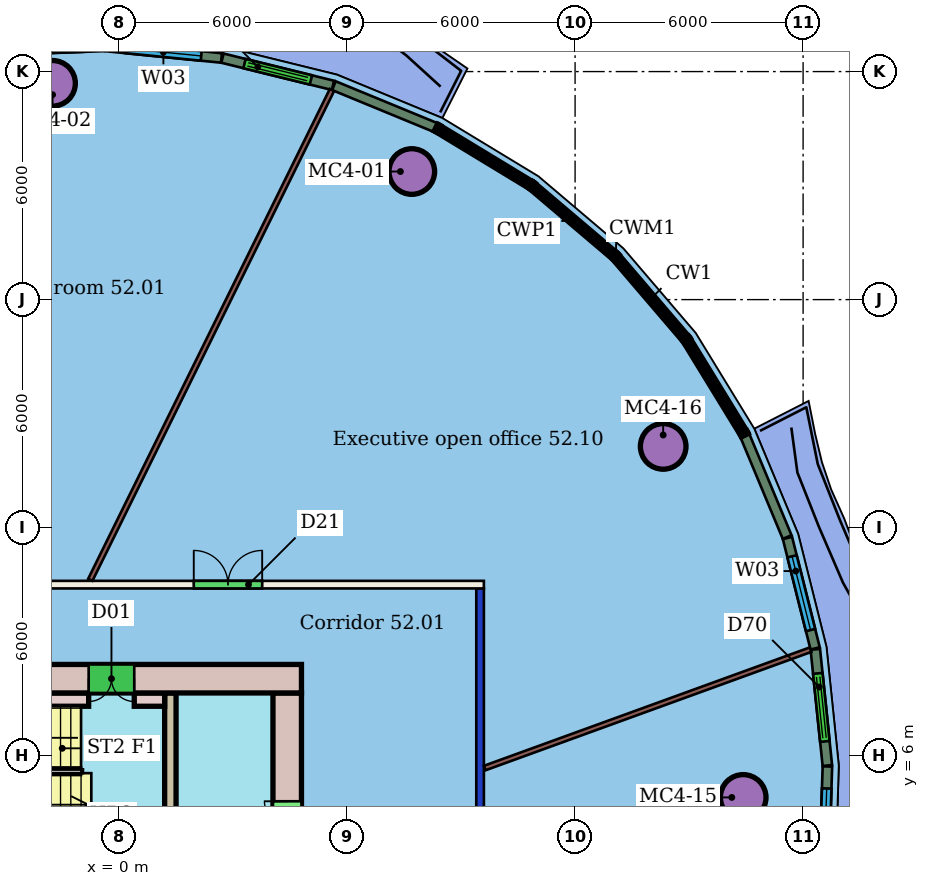
"""IFC4 building model, lengths in metres.
Left out: names, types, materials, properties, quantities, classifications, styles, units other than length and angle.
Written with IfcOpenShell. Run it as: python <this file> out.ifc"""

import sys

from ifc_helpers import new_model, si_unit, direction, frame, frame_2d, origin, origin_2d, place, context, subcontext, project, spatial, rectangle, hollow_circle, extrude, element, fill, save


model = new_model("IFC4")
c1 = context("Model", 3, precision=1e-05, world=origin(), true_north=direction((0.0, 1.0)))
c2 = subcontext(c1, "Body", "Model", "MODEL_VIEW")
j1 = project(units=[si_unit("LENGTHUNIT", "METRE"), si_unit("PLANEANGLEUNIT", "RADIAN")], contexts=[c1])
p1 = place(None, origin())
s1 = spatial("IfcSite", under=j1, at=p1, CompositionType="ELEMENT")
p2 = place(p1, origin())
s2 = spatial("IfcBuilding", under=s1, at=p2, CompositionType="ELEMENT")
p3 = place(p2, frame((0.0, 0.0, 213.7)))
s3 = spatial("IfcBuildingStorey", under=s2, at=p3, CompositionType="ELEMENT", Elevation=213.7)
for number, where, z_axis, x_axis in (
    (1, (7.704, 21.37, 0.0), (0.0, 0.0, 1.0), (1.0, 0.0, 0.0)),
    (2, (-1.75, 23.691, 0.0), (0.0, 0.0, 1.0), (1.0, 0.0, 0.0)),
    (3, (16.424, 4.901, 0.0), (0.0, 0.0, 1.0), (1.0, 0.0, 0.0)),
    (4, (14.318, 14.137, 0.0), (0.0, 0.0, 1.0), (1.0, 0.0, 0.0)),
):
    element("IfcColumn", number, at=place(p3, frame(where, z_axis=z_axis, x_axis=x_axis)), inside=s3, PredefinedType="COLUMN", context=c2, shape_type="SweptSolid", body=[
        extrude(hollow_circle(Radius=0.6, WallThickness=0.045, at=origin_2d()), origin(), (0.0, 0.0, 1.0), 3.45),
    ])
p4 = place(p3, frame((-21.6, 10.5, 0.0), z_axis=(0.0, 0.0, 1.0), x_axis=(1.0, 0.0, 0.0)))
e5 = element("IfcWall", 5, at=p4, inside=s3, PredefinedType="PARTITIONING", context=c2, shape_type="SweptSolid", body=[
    extrude(rectangle(XDim=31.2, YDim=0.2, at=frame_2d((15.6, 0.0))), origin(), (0.0, 0.0, 1.0), 3.45),
])
p5 = place(p4, frame((18.296, 0.0, 0.0)))
e6 = element("IfcOpeningElement", 6, at=p5, cuts=e5, PredefinedType="OPENING", context=c2, shape_type="SweptSolid", body=[
    extrude(rectangle(XDim=1.0, YDim=2.4, at=frame_2d((0.5, 1.2))), frame((0.0, 0.11, 0.0), z_axis=(0.0, -1.0, 0.0), x_axis=(1.0, 0.0, 0.0)), (0.0, 0.0, 1.0), 0.22),
])
p6 = place(p4, frame((11.6, 0.0, 0.0)))
e7 = element("IfcOpeningElement", 7, at=p6, cuts=e5, PredefinedType="OPENING", context=c2, shape_type="SweptSolid", body=[
    extrude(rectangle(XDim=1.0, YDim=2.4, at=frame_2d((0.5, 1.2))), frame((0.0, 0.11, 0.0), z_axis=(0.0, -1.0, 0.0), x_axis=(1.0, 0.0, 0.0)), (0.0, 0.0, 1.0), 0.22),
])
p7 = place(p4, frame((5.73, 0.0, 0.0)))
e8 = element("IfcOpeningElement", 8, at=p7, cuts=e5, PredefinedType="OPENING", context=c2, shape_type="SweptSolid", body=[
    extrude(rectangle(XDim=1.8, YDim=2.4, at=frame_2d((0.9, 1.2))), frame((0.0, 0.11, 0.0), z_axis=(0.0, -1.0, 0.0), x_axis=(1.0, 0.0, 0.0)), (0.0, 0.0, 1.0), 0.22),
])
p8 = place(p4, frame((23.566, 0.0, 0.0)))
e9 = element("IfcOpeningElement", 9, at=p8, cuts=e5, PredefinedType="OPENING", context=c2, shape_type="SweptSolid", body=[
    extrude(rectangle(XDim=1.8, YDim=2.1, at=frame_2d((0.9, 1.05))), frame((0.0, 0.11, 0.0), z_axis=(0.0, -1.0, 0.0), x_axis=(1.0, 0.0, 0.0)), (0.0, 0.0, 1.0), 0.22),
])
p9 = place(p3, frame((9.5, 10.4, 0.0), z_axis=(0.0, 0.0, 1.0), x_axis=(0.0, -1.0, 0.0)))
e10 = element("IfcWall", 10, at=p9, inside=s3, PredefinedType="PARTITIONING", context=c2, shape_type="SweptSolid", body=[
    extrude(rectangle(XDim=20.8, YDim=0.2, at=frame_2d((10.4, 0.0))), origin(), (0.0, 0.0, 1.0), 3.05),
])
p10 = place(p9, frame((17.01, 0.0, 0.0)))
e11 = element("IfcOpeningElement", 11, at=p10, cuts=e10, PredefinedType="OPENING", context=c2, shape_type="SweptSolid", body=[
    extrude(rectangle(XDim=1.0, YDim=2.4, at=frame_2d((0.5, 1.2))), frame((0.0, 0.11, 0.0), z_axis=(0.0, -1.0, 0.0), x_axis=(1.0, 0.0, 0.0)), (0.0, 0.0, 1.0), 0.22),
])
p11 = place(p9, frame((11.015, 0.0, 0.0)))
e12 = element("IfcOpeningElement", 12, at=p11, cuts=e10, PredefinedType="OPENING", context=c2, shape_type="SweptSolid", body=[
    extrude(rectangle(XDim=1.5, YDim=2.1, at=frame_2d((0.75, 1.05))), frame((0.0, 0.11, 0.0), z_axis=(0.0, -1.0, 0.0), x_axis=(1.0, 0.0, 0.0)), (0.0, 0.0, 1.0), 0.22),
])
p12 = place(p3, frame((5.603, 23.515, 0.0), z_axis=(0.0, 0.0, 1.0), x_axis=(-0.442477794817, -0.896779460678, 0.0)))
e13 = element("IfcWall", 13, at=p12, inside=s3, PredefinedType="PARTITIONING", context=c2, shape_type="SweptSolid", body=[
    extrude(rectangle(XDim=14.371, YDim=0.125, at=frame_2d((7.186, 0.0))), origin(), (0.0, 0.0, 1.0), 3.45),
])
p13 = place(p3, frame((18.197, 8.789, 0.0), z_axis=(0.0, 0.0, 1.0), x_axis=(-0.939914460754, -0.341410026896, 0.0)))
e14 = element("IfcWall", 14, at=p13, inside=s3, PredefinedType="PARTITIONING", context=c2, shape_type="SweptSolid", body=[
    extrude(rectangle(XDim=9.124, YDim=0.125, at=frame_2d((4.562, 0.0))), origin(), (0.0, 0.0, 1.0), 3.45),
])
p14 = place(p3, frame((8.323, 22.53, 0.0), z_axis=(0.0, 0.0, 1.0), x_axis=(-0.924690360412, 0.380720024901, 0.0)))
e15 = element("IfcWall", 15, at=p14, inside=s3, PredefinedType="SOLIDWALL", context=c2, shape_type="SweptSolid", body=[
    extrude(rectangle(XDim=2.886, YDim=0.25, at=frame_2d((1.443, 0.0))), origin(), (0.0, 0.0, 1.0), 3.1),
])
p15 = place(p3, frame((5.628, 23.637, 0.0), z_axis=(0.0, 0.0, 1.0), x_axis=(-0.9709618668, 0.239234306113, 0.0)))
e16 = element("IfcWall", 16, at=p15, inside=s3, PredefinedType="SOLIDWALL", context=c2, shape_type="SweptSolid", body=[
    extrude(rectangle(XDim=2.994, YDim=0.25, at=frame_2d((1.497, 0.0))), origin(), (0.0, 0.0, 1.0), 3.1),
])
p16 = place(p15, frame((0.597, 0.0, 0.0)))
e17 = element("IfcOpeningElement", 17, at=p16, cuts=e16, PredefinedType="OPENING", context=c2, shape_type="SweptSolid", body=[
    extrude(rectangle(XDim=1.8, YDim=2.4, at=frame_2d((0.9, 1.2))), frame((0.0, 0.135, 0.0), z_axis=(0.0, -1.0, 0.0), x_axis=(1.0, 0.0, 0.0)), (0.0, 0.0, 1.0), 0.27),
])
p17 = place(p3, frame((2.696, 24.358, 0.0), z_axis=(0.0, 0.0, 1.0), x_axis=(-0.995081139356, 0.099063242917, 0.0)))
e18 = element("IfcWall", 18, at=p17, inside=s3, PredefinedType="SOLIDWALL", context=c2, shape_type="SweptSolid", body=[
    extrude(rectangle(XDim=3.073, YDim=0.25, at=frame_2d((1.537, 0.0))), origin(), (0.0, 0.0, 1.0), 3.1),
])
p18 = place(p17, frame((0.537, 0.0, 0.9)))
e19 = element("IfcOpeningElement", 19, at=p18, cuts=e18, PredefinedType="OPENING", context=c2, shape_type="SweptSolid", body=[
    extrude(rectangle(XDim=2.0, YDim=2.1, at=frame_2d((1.0, 1.05))), frame((0.0, 0.135, 0.0), z_axis=(0.0, -1.0, 0.0), x_axis=(1.0, 0.0, 0.0)), (0.0, 0.0, 1.0), 0.27),
])
p19 = place(p3, frame((-0.387, 24.663, 0.0), z_axis=(0.0, 0.0, 1.0), x_axis=(-0.999351383862, -0.036011270096, 0.0)))
e20 = element("IfcWall", 20, at=p19, inside=s3, PredefinedType="SOLIDWALL", context=c2, shape_type="SweptSolid", body=[
    extrude(rectangle(XDim=3.159, YDim=0.25, at=frame_2d((1.58, 0.0))), origin(), (0.0, 0.0, 1.0), 3.1),
])
p20 = place(p19, frame((0.58, 0.0, 0.9)))
e21 = element("IfcOpeningElement", 21, at=p20, cuts=e20, PredefinedType="OPENING", context=c2, shape_type="SweptSolid", body=[
    extrude(rectangle(XDim=2.0, YDim=2.1, at=frame_2d((1.0, 1.05))), frame((0.0, 0.135, 0.0), z_axis=(0.0, -1.0, 0.0), x_axis=(1.0, 0.0, 0.0)), (0.0, 0.0, 1.0), 0.27),
])
p21 = place(p3, frame((18.539, 2.558, 0.0), z_axis=(0.0, 0.0, 1.0), x_axis=(0.031760681262, 0.999495502304, 0.0)))
e22 = element("IfcWall", 22, at=p21, inside=s3, PredefinedType="SOLIDWALL", context=c2, shape_type="SweptSolid", body=[
    extrude(rectangle(XDim=3.159, YDim=0.25, at=frame_2d((1.58, 0.0))), origin(), (0.0, 0.0, 1.0), 3.1),
])
p22 = place(p21, frame((0.58, 0.0, 0.9)))
e23 = element("IfcOpeningElement", 23, at=p22, cuts=e22, PredefinedType="OPENING", context=c2, shape_type="SweptSolid", body=[
    extrude(rectangle(XDim=2.0, YDim=2.1, at=frame_2d((1.0, 1.05))), frame((0.0, 0.135, 0.0), z_axis=(0.0, -1.0, 0.0), x_axis=(1.0, 0.0, 0.0)), (0.0, 0.0, 1.0), 0.27),
])
p23 = place(p3, frame((18.639, 5.741, 0.0), z_axis=(0.0, 0.0, 1.0), x_axis=(-0.10327045025, 0.994653313524, 0.0)))
e24 = element("IfcWall", 24, at=p23, inside=s3, PredefinedType="SOLIDWALL", context=c2, shape_type="SweptSolid", body=[
    extrude(rectangle(XDim=3.073, YDim=0.25, at=frame_2d((1.537, 0.0))), origin(), (0.0, 0.0, 1.0), 3.1),
])
p24 = place(p23, frame((0.637, 0.0, 0.0)))
e25 = element("IfcOpeningElement", 25, at=p24, cuts=e24, PredefinedType="OPENING", context=c2, shape_type="SweptSolid", body=[
    extrude(rectangle(XDim=1.8, YDim=2.4, at=frame_2d((0.9, 1.2))), frame((0.0, 0.135, 0.0), z_axis=(0.0, -1.0, 0.0), x_axis=(1.0, 0.0, 0.0)), (0.0, 0.0, 1.0), 0.27),
])
p25 = place(p3, frame((18.317, 8.823, 0.0), z_axis=(0.0, 0.0, 1.0), x_axis=(-0.243245471753, 0.96996476249, 0.0)))
e26 = element("IfcWall", 26, at=p25, inside=s3, PredefinedType="SOLIDWALL", context=c2, shape_type="SweptSolid", body=[
    extrude(rectangle(XDim=2.994, YDim=0.25, at=frame_2d((1.497, 0.0))), origin(), (0.0, 0.0, 1.0), 3.1),
])
p26 = place(p25, frame((0.497, 0.0, 0.9)))
e27 = element("IfcOpeningElement", 27, at=p26, cuts=e26, PredefinedType="OPENING", context=c2, shape_type="SweptSolid", body=[
    extrude(rectangle(XDim=2.0, YDim=2.1, at=frame_2d((1.0, 1.05))), frame((0.0, 0.135, 0.0), z_axis=(0.0, -1.0, 0.0), x_axis=(1.0, 0.0, 0.0)), (0.0, 0.0, 1.0), 0.27),
])
p27 = place(p3, frame((17.58, 11.752, 0.0), z_axis=(0.0, 0.0, 1.0), x_axis=(-0.384537301957, 0.923109453642, 0.0)))
e28 = element("IfcWall", 28, at=p27, inside=s3, PredefinedType="SOLIDWALL", context=c2, shape_type="SweptSolid", body=[
    extrude(rectangle(XDim=2.886, YDim=0.25, at=frame_2d((1.443, 0.0))), origin(), (0.0, 0.0, 1.0), 3.1),
])
p28 = place(p3, frame((4.8, 8.025, 0.0), z_axis=(0.0, 0.0, 1.0), x_axis=(-1.0, 0.0, 0.0)))
e29 = element("IfcWall", 29, at=p28, inside=s3, PredefinedType="SHEAR", context=c2, shape_type="SweptSolid", body=[
    extrude(rectangle(XDim=10.8, YDim=0.75, at=frame_2d((5.4, 0.0))), origin(), (0.0, 0.0, 1.0), 3.3),
])
p29 = place(p28, frame((4.4, 0.0, 0.0)))
e30 = element("IfcOpeningElement", 30, at=p29, cuts=e29, PredefinedType="OPENING", context=c2, shape_type="SweptSolid", body=[
    extrude(rectangle(XDim=1.2, YDim=2.1, at=frame_2d((0.6, 1.05))), frame((0.0, 0.385, 0.0), z_axis=(0.0, -1.0, 0.0), x_axis=(1.0, 0.0, 0.0)), (0.0, 0.0, 1.0), 0.77),
])
p30 = place(p3, frame((4.425, -7.65, 0.0), z_axis=(0.0, 0.0, 1.0), x_axis=(0.0, 1.0, 0.0)))
e31 = element("IfcWall", 31, at=p30, inside=s3, PredefinedType="SHEAR", context=c2, shape_type="SweptSolid", body=[
    extrude(rectangle(XDim=15.3, YDim=0.75, at=frame_2d((7.65, 0.0))), origin(), (0.0, 0.0, 1.0), 3.3),
])
p31 = place(p30, frame((2.85, 0.0, 0.0)))
e32 = element("IfcOpeningElement", 32, at=p31, cuts=e31, PredefinedType="OPENING", context=c2, shape_type="SweptSolid", body=[
    extrude(rectangle(XDim=1.2, YDim=2.1, at=frame_2d((0.6, 1.05))), frame((0.0, 0.385, 0.0), z_axis=(0.0, -1.0, 0.0), x_axis=(1.0, 0.0, 0.0)), (0.0, 0.0, 1.0), 0.77),
])
p32 = place(p30, frame((11.25, 0.0, 0.0)))
e33 = element("IfcOpeningElement", 33, at=p32, cuts=e31, PredefinedType="OPENING", context=c2, shape_type="SweptSolid", body=[
    extrude(rectangle(XDim=1.2, YDim=2.1, at=frame_2d((0.6, 1.05))), frame((0.0, 0.385, 0.0), z_axis=(0.0, -1.0, 0.0), x_axis=(1.0, 0.0, 0.0)), (0.0, 0.0, 1.0), 0.77),
])
p33 = place(p3, frame((1.35, -7.65, 0.0), z_axis=(0.0, 0.0, 1.0), x_axis=(0.0, 1.0, 0.0)))
e34 = element("IfcWall", 34, at=p33, inside=s3, PredefinedType="SHEAR", context=c2, shape_type="SweptSolid", body=[
    extrude(rectangle(XDim=15.3, YDim=0.3, at=frame_2d((7.65, 0.0))), origin(), (0.0, 0.0, 1.0), 3.3),
])
p34 = place(p33, frame((1.56, 0.0, 0.0)))
e35 = element("IfcOpeningElement", 35, at=p34, cuts=e34, PredefinedType="OPENING", context=c2, shape_type="SweptSolid", body=[
    extrude(rectangle(XDim=1.0, YDim=2.1, at=frame_2d((0.5, 1.05))), frame((0.0, 0.16, 0.0), z_axis=(0.0, -1.0, 0.0), x_axis=(1.0, 0.0, 0.0)), (0.0, 0.0, 1.0), 0.32),
])
p35 = place(p33, frame((6.9, 0.0, 0.0)))
e36 = element("IfcOpeningElement", 36, at=p35, cuts=e34, PredefinedType="OPENING", context=c2, shape_type="SweptSolid", body=[
    extrude(rectangle(XDim=1.5, YDim=2.1, at=frame_2d((0.75, 1.05))), frame((0.0, 0.16, 0.0), z_axis=(0.0, -1.0, 0.0), x_axis=(1.0, 0.0, 0.0)), (0.0, 0.0, 1.0), 0.32),
])
p36 = place(p3, frame((-5.85, 7.475, 0.0), z_axis=(0.0, 0.0, 1.0), x_axis=(1.0, 0.0, 0.0)))
e37 = element("IfcWall", 37, at=p36, inside=s3, PredefinedType="SHEAR", context=c2, shape_type="SweptSolid", body=[
    extrude(rectangle(XDim=5.05, YDim=0.35, at=frame_2d((2.525, 0.0))), origin(), (0.0, 0.0, 1.0), 3.3),
])
p37 = place(p3, frame((0.4, 7.475, 0.0), z_axis=(0.0, 0.0, 1.0), x_axis=(1.0, 0.0, 0.0)))
e38 = element("IfcWall", 38, at=p37, inside=s3, PredefinedType="SHEAR", context=c2, shape_type="SweptSolid", body=[
    extrude(rectangle(XDim=0.8, YDim=0.35, at=frame_2d((0.4, 0.0))), origin(), (0.0, 0.0, 1.0), 3.3),
])
p38 = place(p8, origin())
e39 = element("IfcDoor", 39, at=p38, inside=s3, OperationType="DOUBLE_DOOR_SINGLE_SWING", PredefinedType="DOOR", context=c2, shape_type="SweptSolid", body=[
    extrude(rectangle(XDim=1.8, YDim=2.1, at=frame_2d((0.9, 1.05))), frame((0.0, 0.025, 0.0), z_axis=(0.0, -1.0, 0.0), x_axis=(1.0, 0.0, 0.0)), (0.0, 0.0, 1.0), 0.05),
])
fill(e9, e39)
p39 = place(p16, origin())
e40 = element("IfcDoor", 40, at=p39, inside=s3, OperationType="DOUBLE_DOOR_SLIDING", PredefinedType="DOOR", context=c2, shape_type="SweptSolid", body=[
    extrude(rectangle(XDim=1.8, YDim=2.4, at=frame_2d((0.9, 1.2))), frame((0.0, 0.025, 0.0), z_axis=(0.0, -1.0, 0.0), x_axis=(1.0, 0.0, 0.0)), (0.0, 0.0, 1.0), 0.05),
])
fill(e17, e40)
p40 = place(p18, origin())
e41 = element("IfcWindow", 41, at=p40, inside=s3, PartitioningType="SINGLE_PANEL", PredefinedType="WINDOW", context=c2, shape_type="SweptSolid", body=[
    extrude(rectangle(XDim=2.0, YDim=2.1, at=frame_2d((1.0, 1.05))), frame((0.0, 0.03, 0.0), z_axis=(0.0, -1.0, 0.0), x_axis=(1.0, 0.0, 0.0)), (0.0, 0.0, 1.0), 0.06),
])
fill(e19, e41)
p41 = place(p22, origin())
e42 = element("IfcWindow", 42, at=p41, inside=s3, PartitioningType="SINGLE_PANEL", PredefinedType="WINDOW", context=c2, shape_type="SweptSolid", body=[
    extrude(rectangle(XDim=2.0, YDim=2.1, at=frame_2d((1.0, 1.05))), frame((0.0, 0.03, 0.0), z_axis=(0.0, -1.0, 0.0), x_axis=(1.0, 0.0, 0.0)), (0.0, 0.0, 1.0), 0.06),
])
fill(e23, e42)
p42 = place(p24, origin())
e43 = element("IfcDoor", 43, at=p42, inside=s3, OperationType="DOUBLE_DOOR_SLIDING", PredefinedType="DOOR", context=c2, shape_type="SweptSolid", body=[
    extrude(rectangle(XDim=1.8, YDim=2.4, at=frame_2d((0.9, 1.2))), frame((0.0, 0.025, 0.0), z_axis=(0.0, -1.0, 0.0), x_axis=(1.0, 0.0, 0.0)), (0.0, 0.0, 1.0), 0.05),
])
fill(e25, e43)
p43 = place(p26, origin())
e44 = element("IfcWindow", 44, at=p43, inside=s3, PartitioningType="SINGLE_PANEL", PredefinedType="WINDOW", context=c2, shape_type="SweptSolid", body=[
    extrude(rectangle(XDim=2.0, YDim=2.1, at=frame_2d((1.0, 1.05))), frame((0.0, 0.03, 0.0), z_axis=(0.0, -1.0, 0.0), x_axis=(1.0, 0.0, 0.0)), (0.0, 0.0, 1.0), 0.06),
])
fill(e27, e44)
p44 = place(p29, origin())
e45 = element("IfcDoor", 45, at=p44, inside=s3, OperationType="DOUBLE_DOOR_SINGLE_SWING", PredefinedType="NOTDEFINED", context=c2, shape_type="SweptSolid", body=[
    extrude(rectangle(XDim=1.2, YDim=2.1, at=frame_2d((0.6, 1.05))), frame((0.0, 0.025, 0.0), z_axis=(0.0, -1.0, 0.0), x_axis=(1.0, 0.0, 0.0)), (0.0, 0.0, 1.0), 0.05),
])
fill(e30, e45)
p45 = place(p32, origin())
e46 = element("IfcDoor", 46, at=p45, inside=s3, OperationType="DOUBLE_DOOR_SINGLE_SWING", PredefinedType="NOTDEFINED", context=c2, shape_type="SweptSolid", body=[
    extrude(rectangle(XDim=1.2, YDim=2.1, at=frame_2d((0.6, 1.05))), frame((0.0, 0.025, 0.0), z_axis=(0.0, -1.0, 0.0), x_axis=(1.0, 0.0, 0.0)), (0.0, 0.0, 1.0), 0.05),
])
fill(e33, e46)
save(model, sys.argv[1])
